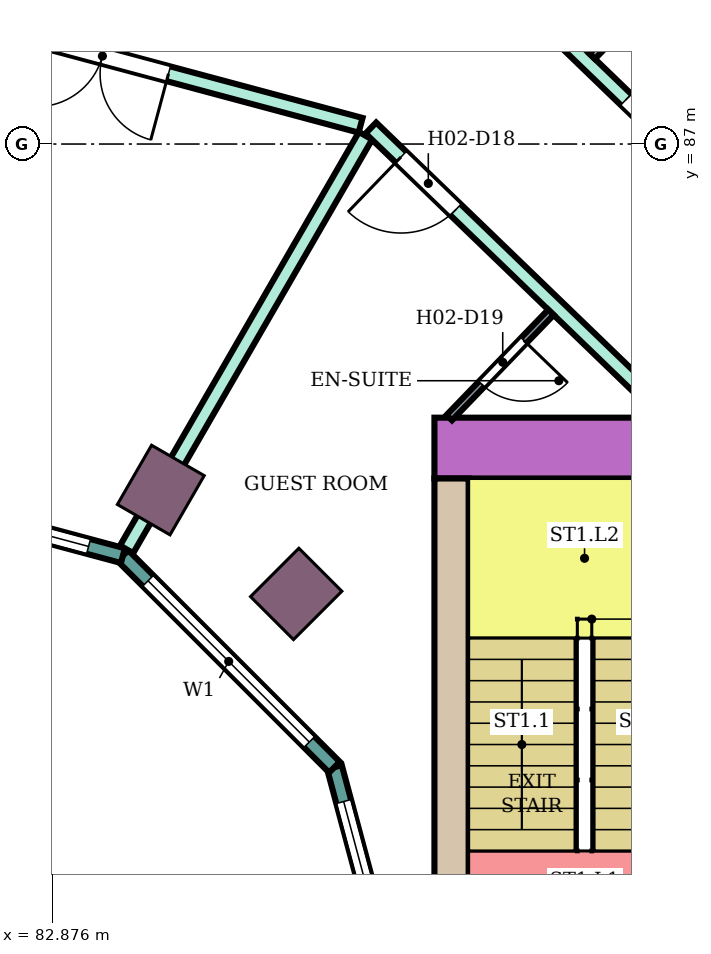
"""IFC4 building model, lengths in metres.
Left out: names, types, materials, properties, quantities, classifications, styles, units other than length and angle.
Written with IfcOpenShell. Run it as: python <this file> out.ifc"""

import sys

from ifc_helpers import new_model, si_unit, direction, frame, frame_2d, origin, origin_2d, place, context, subcontext, project, spatial, rectangle, extrude, element, fill, save


model = new_model("IFC4")
c1 = context("Model", 3, precision=1e-05, world=origin(), true_north=direction((0.0, 1.0)))
c2 = subcontext(c1, "Body", "Model", "MODEL_VIEW")
j1 = project(units=[si_unit("LENGTHUNIT", "METRE"), si_unit("PLANEANGLEUNIT", "RADIAN")], contexts=[c1])
p1 = place(None, origin())
s1 = spatial("IfcSite", under=j1, at=p1, CompositionType="ELEMENT")
p2 = place(p1, origin())
s2 = spatial("IfcBuilding", under=s1, at=p2, CompositionType="ELEMENT")
p3 = place(p2, frame((0.0, 0.0, 47.8)))
s3 = spatial("IfcBuildingStorey", under=s2, at=p3, CompositionType="ELEMENT", Elevation=47.8)
for number, where, z_axis, x_axis in (
    (1, (86.081, 81.081, 0.0), (0.0, 0.0, 1.0), (0.707, 0.707, 0.0)),
    (2, (84.3, 82.448, 0.0), (0.0, 0.0, 1.0), (0.5, 0.866, 0.0)),
):
    element("IfcColumn", number, at=place(p3, frame(where, z_axis=z_axis, x_axis=x_axis)), inside=s3, PredefinedType="COLUMN", context=c2, shape_type="SweptSolid", body=[
        extrude(rectangle(XDim=0.9, YDim=0.8, at=origin_2d()), origin(), (0.0, 0.0, 1.0), 3.8),
    ])
p4 = place(p3, frame((87.9, 83.0, 0.0), z_axis=(0.0, 0.0, 1.0), x_axis=(1.0, 0.0, 0.0)))
e3 = element("IfcWall", 3, at=p4, inside=s3, PredefinedType="SHEAR", context=c2, shape_type="SweptSolid", body=[
    extrude(rectangle(XDim=14.7, YDim=0.8, at=frame_2d((7.35, 0.0))), origin(), (0.0, 0.0, 1.0), 3.48),
])
p5 = place(p4, frame((4.2, 0.0, 0.0)))
e4 = element("IfcOpeningElement", 4, at=p5, cuts=e3, PredefinedType="OPENING", context=c2, shape_type="SweptSolid", body=[
    extrude(rectangle(XDim=2.4, YDim=2.4, at=frame_2d((1.2, 1.2))), frame((0.0, 0.41, 0.0), z_axis=(0.0, -1.0, 0.0), x_axis=(1.0, 0.0, 0.0)), (0.0, 0.0, 1.0), 0.82),
])
p6 = place(p3, frame((88.125, 75.0, 0.0), z_axis=(0.0, 0.0, 1.0), x_axis=(0.0, 1.0, 0.0)))
e5 = element("IfcWall", 5, at=p6, inside=s3, PredefinedType="SHEAR", context=c2, shape_type="SweptSolid", body=[
    extrude(rectangle(XDim=7.6, YDim=0.45, at=frame_2d((3.8, 0.0))), origin(), (0.0, 0.0, 1.0), 3.48),
])
p7 = place(p3, frame((87.604, 75.0, 0.0), z_axis=(0.0, 0.0, 1.0), x_axis=(-0.258789828301, 0.965933654434, 0.0)))
e6 = element("IfcWall", 6, at=p7, inside=s3, PredefinedType="NOTDEFINED", context=c2, shape_type="SweptSolid", body=[
    extrude(rectangle(XDim=3.936, YDim=0.2, at=frame_2d((1.968, 0.0))), origin(), (0.0, 0.0, 1.0), 3.8),
])
p8 = place(p7, frame((0.468, 0.0, 0.9)))
e7 = element("IfcOpeningElement", 7, at=p8, cuts=e6, PredefinedType="OPENING", context=c2, shape_type="SweptSolid", body=[
    extrude(rectangle(XDim=3.0, YDim=2.3, at=frame_2d((1.5, 1.15))), frame((0.0, 0.11, 0.0), z_axis=(0.0, -1.0, 0.0), x_axis=(1.0, 0.0, 0.0)), (0.0, 0.0, 1.0), 0.22),
])
p9 = place(p3, frame((86.585, 78.802, 0.0), z_axis=(0.0, 0.0, 1.0), x_axis=(-0.707106781187, 0.707106781187, 0.0)))
e8 = element("IfcWall", 8, at=p9, inside=s3, PredefinedType="NOTDEFINED", context=c2, shape_type="SweptSolid", body=[
    extrude(rectangle(XDim=3.936, YDim=0.2, at=frame_2d((1.968, 0.0))), origin(), (0.0, 0.0, 1.0), 3.8),
])
p10 = place(p9, frame((0.468, 0.0, 0.9)))
e9 = element("IfcOpeningElement", 9, at=p10, cuts=e8, PredefinedType="OPENING", context=c2, shape_type="SweptSolid", body=[
    extrude(rectangle(XDim=3.0, YDim=2.3, at=frame_2d((1.5, 1.15))), frame((0.0, 0.11, 0.0), z_axis=(0.0, -1.0, 0.0), x_axis=(1.0, 0.0, 0.0)), (0.0, 0.0, 1.0), 0.22),
])
p11 = place(p3, frame((83.802, 81.585, 0.0), z_axis=(0.0, 0.0, 1.0), x_axis=(-0.965933654434, 0.258789828301, 0.0)))
e10 = element("IfcWall", 10, at=p11, inside=s3, PredefinedType="NOTDEFINED", context=c2, shape_type="SweptSolid", body=[
    extrude(rectangle(XDim=3.936, YDim=0.2, at=frame_2d((1.968, 0.0))), origin(), (0.0, 0.0, 1.0), 3.8),
])
p12 = place(p11, frame((0.468, 0.0, 0.9)))
e11 = element("IfcOpeningElement", 11, at=p12, cuts=e10, PredefinedType="OPENING", context=c2, shape_type="SweptSolid", body=[
    extrude(rectangle(XDim=3.0, YDim=2.3, at=frame_2d((1.5, 1.15))), frame((0.0, 0.11, 0.0), z_axis=(0.0, -1.0, 0.0), x_axis=(1.0, 0.0, 0.0)), (0.0, 0.0, 1.0), 0.22),
])
p13 = place(p3, frame((80.0, 89.104, 0.0), z_axis=(0.0, 0.0, 1.0), x_axis=(0.965886659739, -0.258965172444, 0.0)))
e12 = element("IfcWall", 12, at=p13, inside=s3, PredefinedType="PARTITIONING", context=c2, shape_type="SweptSolid", body=[
    extrude(rectangle(XDim=7.173, YDim=0.2, at=frame_2d((3.587, 0.0))), origin(), (0.0, 0.0, 1.0), 3.35),
])
p14 = place(p13, frame((2.757, 0.0, 0.0)))
e13 = element("IfcOpeningElement", 13, at=p14, cuts=e12, PredefinedType="OPENING", context=c2, shape_type="SweptSolid", body=[
    extrude(rectangle(XDim=1.8, YDim=2.1, at=frame_2d((0.9, 1.05))), frame((0.0, 0.11, 0.0), z_axis=(0.0, -1.0, 0.0), x_axis=(1.0, 0.0, 0.0)), (0.0, 0.0, 1.0), 0.22),
])
p15 = place(p3, frame((83.85, 81.668, 0.0), z_axis=(0.0, 0.0, 1.0), x_axis=(0.500233583443, 0.865890502313, 0.0)))
e14 = element("IfcWall", 14, at=p15, inside=s3, PredefinedType="PARTITIONING", context=c2, shape_type="SweptSolid", body=[
    extrude(rectangle(XDim=6.284, YDim=0.2, at=frame_2d((3.142, 0.0))), origin(), (0.0, 0.0, 1.0), 3.35),
])
p16 = place(p3, frame((87.064, 87.211, 0.0), z_axis=(0.0, 0.0, 1.0), x_axis=(0.719540958932, -0.694450004262, 0.0)))
e15 = element("IfcWall", 15, at=p16, inside=s3, PredefinedType="PARTITIONING", context=c2, shape_type="SweptSolid", body=[
    extrude(rectangle(XDim=5.488, YDim=0.2, at=frame_2d((2.744, 0.0))), origin(), (0.0, 0.0, 1.0), 3.35),
])
p17 = place(p16, frame((0.55, 0.0, 0.0)))
e16 = element("IfcOpeningElement", 16, at=p17, cuts=e15, PredefinedType="OPENING", context=c2, shape_type="SweptSolid", body=[
    extrude(rectangle(XDim=1.0, YDim=2.1, at=frame_2d((0.5, 1.05))), frame((0.0, 0.11, 0.0), z_axis=(0.0, -1.0, 0.0), x_axis=(1.0, 0.0, 0.0)), (0.0, 0.0, 1.0), 0.22),
])
p18 = place(p3, frame((88.465, 89.473, 0.0), z_axis=(0.0, 0.0, 1.0), x_axis=(0.719474304909, -0.694519059908, 0.0)))
e17 = element("IfcWall", 17, at=p18, inside=s3, PredefinedType="PARTITIONING", context=c2, shape_type="SweptSolid", body=[
    extrude(rectangle(XDim=6.525, YDim=0.2, at=frame_2d((3.263, 0.0))), origin(), (0.0, 0.0, 1.0), 3.35),
])
p19 = place(p18, frame((2.719, 0.0, 0.0)))
e18 = element("IfcOpeningElement", 18, at=p19, cuts=e17, PredefinedType="OPENING", context=c2, shape_type="SweptSolid", body=[
    extrude(rectangle(XDim=1.0, YDim=2.1, at=frame_2d((0.5, 1.05))), frame((0.0, 0.11, 0.0), z_axis=(0.0, -1.0, 0.0), x_axis=(1.0, 0.0, 0.0)), (0.0, 0.0, 1.0), 0.22),
])
p20 = place(p3, frame((88.095, 83.4, 0.0), z_axis=(0.0, 0.0, 1.0), x_axis=(0.694447472534, 0.719543402368, 0.0)))
e19 = element("IfcWall", 19, at=p20, inside=s3, PredefinedType="PARTITIONING", context=c2, shape_type="SweptSolid", body=[
    extrude(rectangle(XDim=1.926, YDim=0.1, at=frame_2d((0.963, 0.0))), origin(), (0.0, 0.0, 1.0), 3.35),
])
p21 = place(p20, frame((0.613, 0.0, 0.0)))
e20 = element("IfcOpeningElement", 20, at=p21, cuts=e19, PredefinedType="OPENING", context=c2, shape_type="SweptSolid", body=[
    extrude(rectangle(XDim=0.8, YDim=2.1, at=frame_2d((0.4, 1.05))), frame((0.0, 0.06, 0.0), z_axis=(0.0, -1.0, 0.0), x_axis=(1.0, 0.0, 0.0)), (0.0, 0.0, 1.0), 0.12),
])
p22 = place(p3, frame((89.976, 88.154, 0.0), z_axis=(0.0, 0.0, 1.0), x_axis=(0.6945137956, 0.719479386585, 0.0)))
e21 = element("IfcWall", 21, at=p22, inside=s3, PredefinedType="PARTITIONING", context=c2, shape_type="SweptSolid", body=[
    extrude(rectangle(XDim=2.699, YDim=0.1, at=frame_2d((1.35, 0.0))), origin(), (0.0, 0.0, 1.0), 3.35),
])
p23 = place(p22, frame((0.9, 0.0, 0.0)))
e22 = element("IfcOpeningElement", 22, at=p23, cuts=e21, PredefinedType="OPENING", context=c2, shape_type="SweptSolid", body=[
    extrude(rectangle(XDim=0.8, YDim=2.1, at=frame_2d((0.4, 1.05))), frame((0.0, 0.06, 0.0), z_axis=(0.0, -1.0, 0.0), x_axis=(1.0, 0.0, 0.0)), (0.0, 0.0, 1.0), 0.12),
])
p24 = place(p8, origin())
e23 = element("IfcWindow", 23, at=p24, inside=s3, PartitioningType="SINGLE_PANEL", PredefinedType="WINDOW", context=c2, shape_type="SweptSolid", body=[
    extrude(rectangle(XDim=3.0, YDim=2.3, at=frame_2d((1.5, 1.15))), frame((0.0, 0.03, 0.0), z_axis=(0.0, -1.0, 0.0), x_axis=(1.0, 0.0, 0.0)), (0.0, 0.0, 1.0), 0.06),
])
fill(e7, e23)
p25 = place(p10, origin())
e24 = element("IfcWindow", 24, at=p25, inside=s3, PartitioningType="SINGLE_PANEL", PredefinedType="WINDOW", context=c2, shape_type="SweptSolid", body=[
    extrude(rectangle(XDim=3.0, YDim=2.3, at=frame_2d((1.5, 1.15))), frame((0.0, 0.03, 0.0), z_axis=(0.0, -1.0, 0.0), x_axis=(1.0, 0.0, 0.0)), (0.0, 0.0, 1.0), 0.06),
])
fill(e9, e24)
p26 = place(p12, origin())
e25 = element("IfcWindow", 25, at=p26, inside=s3, PartitioningType="SINGLE_PANEL", PredefinedType="WINDOW", context=c2, shape_type="SweptSolid", body=[
    extrude(rectangle(XDim=3.0, YDim=2.3, at=frame_2d((1.5, 1.15))), frame((0.0, 0.03, 0.0), z_axis=(0.0, -1.0, 0.0), x_axis=(1.0, 0.0, 0.0)), (0.0, 0.0, 1.0), 0.06),
])
fill(e11, e25)
p27 = place(p19, origin())
e26 = element("IfcDoor", 26, at=p27, inside=s3, OperationType="SINGLE_SWING_RIGHT", PredefinedType="DOOR", context=c2, shape_type="SweptSolid", body=[
    extrude(rectangle(XDim=1.0, YDim=2.1, at=frame_2d((0.5, 1.05))), frame((0.0, 0.025, 0.0), z_axis=(0.0, -1.0, 0.0), x_axis=(1.0, 0.0, 0.0)), (0.0, 0.0, 1.0), 0.05),
])
fill(e18, e26)
p28 = place(p17, frame((1.0, 0.0, 0.0), z_axis=(0.0, 0.0, 1.0), x_axis=(-1.0, 0.0, 0.0)))
e27 = element("IfcDoor", 27, at=p28, inside=s3, OperationType="SINGLE_SWING_RIGHT", PredefinedType="DOOR", context=c2, shape_type="SweptSolid", body=[
    extrude(rectangle(XDim=1.0, YDim=2.1, at=frame_2d((0.5, 1.05))), frame((0.0, 0.025, 0.0), z_axis=(0.0, -1.0, 0.0), x_axis=(1.0, 0.0, 0.0)), (0.0, 0.0, 1.0), 0.05),
])
fill(e16, e27)
p29 = place(p21, frame((0.8, 0.0, 0.0), z_axis=(0.0, 0.0, 1.0), x_axis=(-1.0, 0.0, 0.0)))
e28 = element("IfcDoor", 28, at=p29, inside=s3, OperationType="SINGLE_SWING_LEFT", PredefinedType="DOOR", context=c2, shape_type="SweptSolid", body=[
    extrude(rectangle(XDim=0.8, YDim=2.1, at=frame_2d((0.4, 1.05))), frame((0.0, 0.025, 0.0), z_axis=(0.0, -1.0, 0.0), x_axis=(1.0, 0.0, 0.0)), (0.0, 0.0, 1.0), 0.05),
])
fill(e20, e28)
p30 = place(p14, frame((1.8, 0.0, 0.0), z_axis=(0.0, 0.0, 1.0), x_axis=(-1.0, 0.0, 0.0)))
e29 = element("IfcDoor", 29, at=p30, inside=s3, OperationType="DOUBLE_DOOR_SINGLE_SWING", PredefinedType="DOOR", context=c2, shape_type="SweptSolid", body=[
    extrude(rectangle(XDim=1.8, YDim=2.1, at=frame_2d((0.9, 1.05))), frame((0.0, 0.025, 0.0), z_axis=(0.0, -1.0, 0.0), x_axis=(1.0, 0.0, 0.0)), (0.0, 0.0, 1.0), 0.05),
])
fill(e13, e29)
save(model, sys.argv[1])
